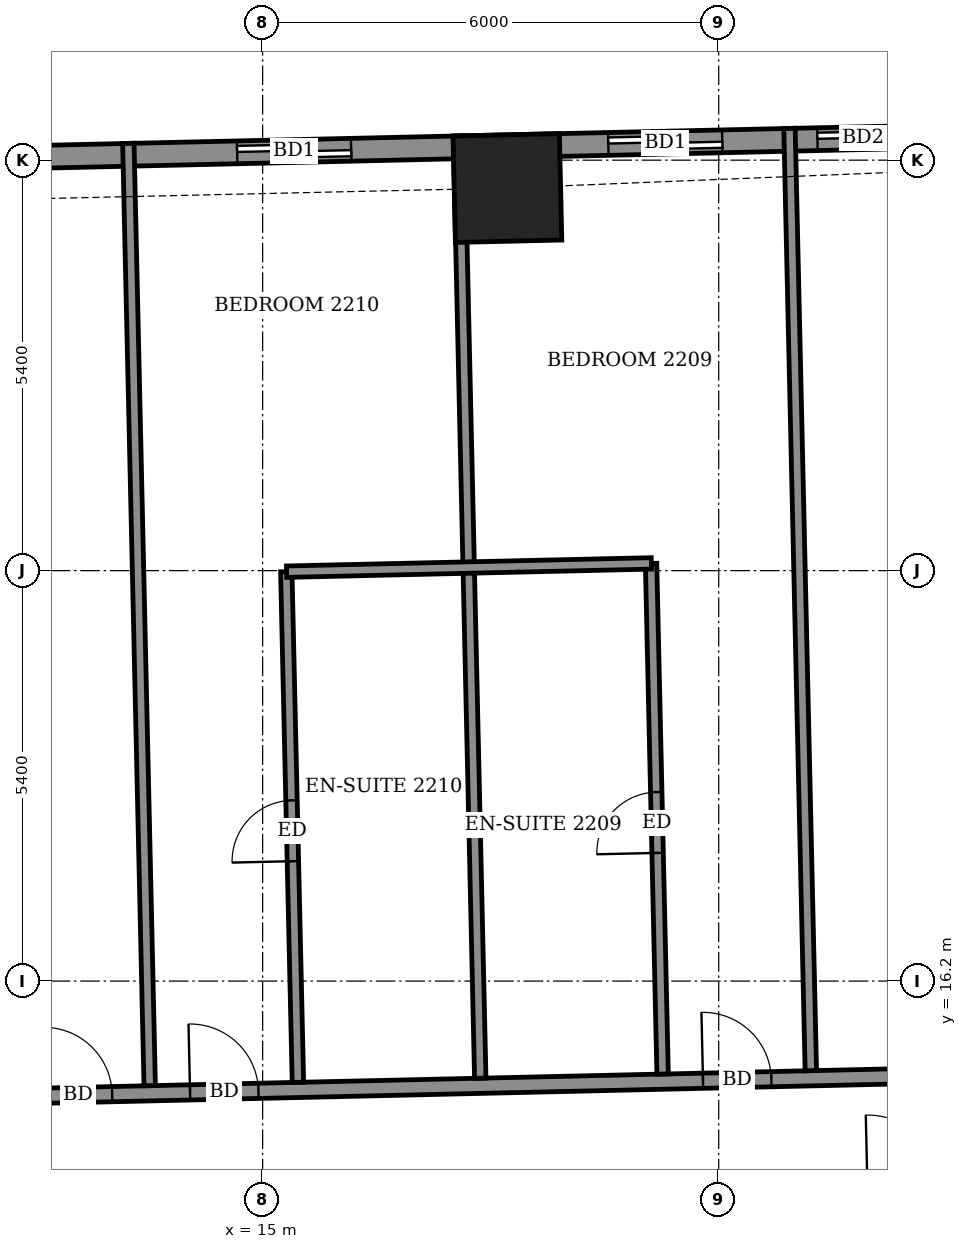
"""IFC4 building model, lengths in metres.
Left out: names, types, materials, properties, quantities, classifications, styles, units other than length and angle.
Written with IfcOpenShell. Run it as: python <this file> out.ifc"""

import sys

from ifc_helpers import new_model, si_unit, direction, frame, frame_2d, origin, origin_2d, place, context, subcontext, project, spatial, rectangle, extrude, element, fill, save


model = new_model("IFC4")
c1 = context("Model", 3, precision=1e-05, world=origin(), true_north=direction((0.0, 1.0)))
c2 = subcontext(c1, "Body", "Model", "MODEL_VIEW")
j1 = project(units=[si_unit("LENGTHUNIT", "METRE"), si_unit("PLANEANGLEUNIT", "RADIAN")], contexts=[c1])
p1 = place(None, origin())
s1 = spatial("IfcSite", under=j1, at=p1, CompositionType="ELEMENT")
p2 = place(p1, origin())
s2 = spatial("IfcBuilding", under=s1, at=p2, CompositionType="ELEMENT")
p3 = place(p2, frame((0.0, 0.0, 90.1)))
s3 = spatial("IfcBuildingStorey", under=s2, at=p3, CompositionType="ELEMENT", Elevation=90.1)
p4 = place(p3, frame((18.22, 26.633, -0.55), z_axis=(0.0, 0.0, 1.0), x_axis=(-0.999741644236, -0.022729821381, 0.0)))
e1 = element("IfcColumn", 1, at=p4, inside=s3, PredefinedType="COLUMN", context=c2, shape_type="SweptSolid", body=[
    extrude(rectangle(XDim=1.4, YDim=1.4, at=origin_2d()), origin(), (0.0, 0.0, 1.0), 3.6),
])
p5 = place(p3, frame((24.809, 27.333, 0.0), z_axis=(0.0, 0.0, 1.0), x_axis=(-0.999742489858, -0.022692597327, 0.0)))
e2 = element("IfcWall", 2, at=p5, inside=s3, PredefinedType="SOLIDWALL", context=c2, shape_type="SweptSolid", body=[
    extrude(rectangle(XDim=46.972, YDim=0.3, at=frame_2d((23.486, 0.0))), origin(), (0.0, 0.0, 1.0), 3.05),
])
p6 = place(p5, frame((1.311, 0.0, 0.0)))
e3 = element("IfcOpeningElement", 3, at=p6, cuts=e2, PredefinedType="OPENING", context=c2, shape_type="SweptSolid", body=[
    extrude(rectangle(XDim=1.2, YDim=2.4, at=frame_2d((0.6, 1.2))), frame((0.0, 0.16, 0.0), z_axis=(0.0, -1.0, 0.0), x_axis=(1.0, 0.0, 0.0)), (0.0, 0.0, 1.0), 0.32),
])
p7 = place(p5, frame((3.763, 0.0, 0.0)))
e4 = element("IfcOpeningElement", 4, at=p7, cuts=e2, PredefinedType="OPENING", context=c2, shape_type="SweptSolid", body=[
    extrude(rectangle(XDim=1.5, YDim=2.4, at=frame_2d((0.75, 1.2))), frame((0.0, 0.16, 0.0), z_axis=(0.0, -1.0, 0.0), x_axis=(1.0, 0.0, 0.0)), (0.0, 0.0, 1.0), 0.32),
])
p8 = place(p5, frame((8.647, 0.0, 0.0)))
e5 = element("IfcOpeningElement", 5, at=p8, cuts=e2, PredefinedType="OPENING", context=c2, shape_type="SweptSolid", body=[
    extrude(rectangle(XDim=1.5, YDim=2.4, at=frame_2d((0.75, 1.2))), frame((0.0, 0.16, 0.0), z_axis=(0.0, -1.0, 0.0), x_axis=(1.0, 0.0, 0.0)), (0.0, 0.0, 1.0), 0.32),
])
p9 = place(p5, frame((14.239, 0.0, 0.0)))
e6 = element("IfcOpeningElement", 6, at=p9, cuts=e2, PredefinedType="OPENING", context=c2, shape_type="SweptSolid", body=[
    extrude(rectangle(XDim=1.2, YDim=2.4, at=frame_2d((0.6, 1.2))), frame((0.0, 0.16, 0.0), z_axis=(0.0, -1.0, 0.0), x_axis=(1.0, 0.0, 0.0)), (0.0, 0.0, 1.0), 0.32),
])
p10 = place(p5, frame((17.016, 0.0, 0.0)))
e7 = element("IfcOpeningElement", 7, at=p10, cuts=e2, PredefinedType="OPENING", context=c2, shape_type="SweptSolid", body=[
    extrude(rectangle(XDim=1.5, YDim=2.4, at=frame_2d((0.75, 1.2))), frame((0.0, 0.16, 0.0), z_axis=(0.0, -1.0, 0.0), x_axis=(1.0, 0.0, 0.0)), (0.0, 0.0, 1.0), 0.32),
])
p11 = place(p5, frame((21.816, 0.0, 0.0)))
e8 = element("IfcOpeningElement", 8, at=p11, cuts=e2, PredefinedType="OPENING", context=c2, shape_type="SweptSolid", body=[
    extrude(rectangle(XDim=1.5, YDim=2.4, at=frame_2d((0.75, 1.2))), frame((0.0, 0.16, 0.0), z_axis=(0.0, -1.0, 0.0), x_axis=(1.0, 0.0, 0.0)), (0.0, 0.0, 1.0), 0.32),
])
p12 = place(p5, frame((24.817, 0.0, 0.0)))
e9 = element("IfcOpeningElement", 9, at=p12, cuts=e2, PredefinedType="OPENING", context=c2, shape_type="SweptSolid", body=[
    extrude(rectangle(XDim=1.2, YDim=2.4, at=frame_2d((0.6, 1.2))), frame((0.0, 0.16, 0.0), z_axis=(0.0, -1.0, 0.0), x_axis=(1.0, 0.0, 0.0)), (0.0, 0.0, 1.0), 0.32),
])
p13 = place(p5, frame((30.244, 0.0, 0.0)))
e10 = element("IfcOpeningElement", 10, at=p13, cuts=e2, PredefinedType="OPENING", context=c2, shape_type="SweptSolid", body=[
    extrude(rectangle(XDim=1.5, YDim=2.4, at=frame_2d((0.75, 1.2))), frame((0.0, 0.16, 0.0), z_axis=(0.0, -1.0, 0.0), x_axis=(1.0, 0.0, 0.0)), (0.0, 0.0, 1.0), 0.32),
])
p14 = place(p5, frame((35.069, 0.0, 0.0)))
e11 = element("IfcOpeningElement", 11, at=p14, cuts=e2, PredefinedType="OPENING", context=c2, shape_type="SweptSolid", body=[
    extrude(rectangle(XDim=1.5, YDim=2.4, at=frame_2d((0.75, 1.2))), frame((0.0, 0.16, 0.0), z_axis=(0.0, -1.0, 0.0), x_axis=(1.0, 0.0, 0.0)), (0.0, 0.0, 1.0), 0.32),
])
p15 = place(p5, frame((37.995, 0.0, 0.0)))
e12 = element("IfcOpeningElement", 12, at=p15, cuts=e2, PredefinedType="OPENING", context=c2, shape_type="SweptSolid", body=[
    extrude(rectangle(XDim=1.5, YDim=2.4, at=frame_2d((0.75, 1.2))), frame((0.0, 0.16, 0.0), z_axis=(0.0, -1.0, 0.0), x_axis=(1.0, 0.0, 0.0)), (0.0, 0.0, 1.0), 0.32),
])
p16 = place(p5, frame((42.674, 0.0, 0.9)))
e13 = element("IfcOpeningElement", 13, at=p16, cuts=e2, PredefinedType="OPENING", context=c2, shape_type="SweptSolid", body=[
    extrude(rectangle(XDim=2.4, YDim=1.5, at=frame_2d((1.2, 0.75))), frame((0.0, 0.16, 0.0), z_axis=(0.0, -1.0, 0.0), x_axis=(1.0, 0.0, 0.0)), (0.0, 0.0, 1.0), 0.32),
])
p17 = place(p3, frame((-24.92, 13.851, 0.0), z_axis=(0.0, 0.0, 1.0), x_axis=(0.999742411711, 0.022696039895, 0.0)))
e14 = element("IfcWall", 14, at=p17, inside=s3, PredefinedType="PARTITIONING", context=c2, shape_type="SweptSolid", body=[
    extrude(rectangle(XDim=52.472, YDim=0.2, at=frame_2d((26.236, 0.0))), origin(), (0.0, 0.0, 1.0), 3.05),
])
p18 = place(p17, frame((50.088, 0.0, 0.0)))
e15 = element("IfcOpeningElement", 15, at=p18, cuts=e14, PredefinedType="OPENING", context=c2, shape_type="SweptSolid", body=[
    extrude(rectangle(XDim=1.0, YDim=2.1, at=frame_2d((0.5, 1.05))), frame((0.0, 0.11, 0.0), z_axis=(0.0, -1.0, 0.0), x_axis=(1.0, 0.0, 0.0)), (0.0, 0.0, 1.0), 0.22),
])
p19 = place(p17, frame((45.725, 0.0, 0.0)))
e16 = element("IfcOpeningElement", 16, at=p19, cuts=e14, PredefinedType="OPENING", context=c2, shape_type="SweptSolid", body=[
    extrude(rectangle(XDim=0.9, YDim=2.1, at=frame_2d((0.45, 1.05))), frame((0.0, 0.11, 0.0), z_axis=(0.0, -1.0, 0.0), x_axis=(1.0, 0.0, 0.0)), (0.0, 0.0, 1.0), 0.22),
])
p20 = place(p17, frame((38.975, 0.0, 0.0)))
e17 = element("IfcOpeningElement", 17, at=p20, cuts=e14, PredefinedType="OPENING", context=c2, shape_type="SweptSolid", body=[
    extrude(rectangle(XDim=0.9, YDim=2.1, at=frame_2d((0.45, 1.05))), frame((0.0, 0.11, 0.0), z_axis=(0.0, -1.0, 0.0), x_axis=(1.0, 0.0, 0.0)), (0.0, 0.0, 1.0), 0.22),
])
p21 = place(p17, frame((37.05, 0.0, 0.0)))
e18 = element("IfcOpeningElement", 18, at=p21, cuts=e14, PredefinedType="OPENING", context=c2, shape_type="SweptSolid", body=[
    extrude(rectangle(XDim=0.9, YDim=2.1, at=frame_2d((0.45, 1.05))), frame((0.0, 0.11, 0.0), z_axis=(0.0, -1.0, 0.0), x_axis=(1.0, 0.0, 0.0)), (0.0, 0.0, 1.0), 0.22),
])
p22 = place(p17, frame((30.35, 0.0, 0.0)))
e19 = element("IfcOpeningElement", 19, at=p22, cuts=e14, PredefinedType="OPENING", context=c2, shape_type="SweptSolid", body=[
    extrude(rectangle(XDim=0.9, YDim=2.1, at=frame_2d((0.45, 1.05))), frame((0.0, 0.11, 0.0), z_axis=(0.0, -1.0, 0.0), x_axis=(1.0, 0.0, 0.0)), (0.0, 0.0, 1.0), 0.22),
])
p23 = place(p17, frame((28.4, 0.0, 0.0)))
e20 = element("IfcOpeningElement", 20, at=p23, cuts=e14, PredefinedType="OPENING", context=c2, shape_type="SweptSolid", body=[
    extrude(rectangle(XDim=0.9, YDim=2.1, at=frame_2d((0.45, 1.05))), frame((0.0, 0.11, 0.0), z_axis=(0.0, -1.0, 0.0), x_axis=(1.0, 0.0, 0.0)), (0.0, 0.0, 1.0), 0.22),
])
p24 = place(p17, frame((21.675, 0.0, 0.0)))
e21 = element("IfcOpeningElement", 21, at=p24, cuts=e14, PredefinedType="OPENING", context=c2, shape_type="SweptSolid", body=[
    extrude(rectangle(XDim=0.9, YDim=2.1, at=frame_2d((0.45, 1.05))), frame((0.0, 0.11, 0.0), z_axis=(0.0, -1.0, 0.0), x_axis=(1.0, 0.0, 0.0)), (0.0, 0.0, 1.0), 0.22),
])
p25 = place(p17, frame((19.775, 0.0, 0.0)))
e22 = element("IfcOpeningElement", 22, at=p25, cuts=e14, PredefinedType="OPENING", context=c2, shape_type="SweptSolid", body=[
    extrude(rectangle(XDim=0.9, YDim=2.1, at=frame_2d((0.45, 1.05))), frame((0.0, 0.11, 0.0), z_axis=(0.0, -1.0, 0.0), x_axis=(1.0, 0.0, 0.0)), (0.0, 0.0, 1.0), 0.22),
])
p26 = place(p17, frame((13.0, 0.0, 0.0)))
e23 = element("IfcOpeningElement", 23, at=p26, cuts=e14, PredefinedType="OPENING", context=c2, shape_type="SweptSolid", body=[
    extrude(rectangle(XDim=0.9, YDim=2.1, at=frame_2d((0.45, 1.05))), frame((0.0, 0.11, 0.0), z_axis=(0.0, -1.0, 0.0), x_axis=(1.0, 0.0, 0.0)), (0.0, 0.0, 1.0), 0.22),
])
p27 = place(p17, frame((11.075, 0.0, 0.0)))
e24 = element("IfcOpeningElement", 24, at=p27, cuts=e14, PredefinedType="OPENING", context=c2, shape_type="SweptSolid", body=[
    extrude(rectangle(XDim=0.9, YDim=2.1, at=frame_2d((0.45, 1.05))), frame((0.0, 0.11, 0.0), z_axis=(0.0, -1.0, 0.0), x_axis=(1.0, 0.0, 0.0)), (0.0, 0.0, 1.0), 0.22),
])
p28 = place(p17, frame((3.049, 0.0, 0.0)))
e25 = element("IfcOpeningElement", 25, at=p28, cuts=e14, PredefinedType="OPENING", context=c2, shape_type="SweptSolid", body=[
    extrude(rectangle(XDim=1.0, YDim=2.1, at=frame_2d((0.5, 1.05))), frame((0.0, 0.11, 0.0), z_axis=(0.0, -1.0, 0.0), x_axis=(1.0, 0.0, 0.0)), (0.0, 0.0, 1.0), 0.22),
])
p29 = place(p3, frame((13.514, 14.824, 0.0), z_axis=(0.0, 0.0, 1.0), x_axis=(-0.022661475803, 0.999743195783, 0.0)))
e26 = element("IfcWall", 26, at=p29, inside=s3, PredefinedType="PARTITIONING", context=c2, shape_type="SweptSolid", body=[
    extrude(rectangle(XDim=12.4, YDim=0.15, at=frame_2d((6.2, 0.0))), origin(), (0.0, 0.0, 1.0), 2.55),
])
p30 = place(p3, frame((15.464, 14.868, 0.0), z_axis=(0.0, 0.0, 1.0), x_axis=(-0.022780001265, 0.999740502102, 0.0)))
e27 = element("IfcWall", 27, at=p30, inside=s3, PredefinedType="PARTITIONING", context=c2, shape_type="SweptSolid", body=[
    extrude(rectangle(XDim=6.72, YDim=0.15, at=frame_2d((3.36, 0.0))), origin(), (0.0, 0.0, 1.0), 3.05),
])
p31 = place(p30, frame((2.91, 0.0, 0.0)))
e28 = element("IfcOpeningElement", 28, at=p31, cuts=e27, PredefinedType="OPENING", context=c2, shape_type="SweptSolid", body=[
    extrude(rectangle(XDim=0.8, YDim=2.1, at=frame_2d((0.4, 1.05))), frame((0.0, 0.085, 0.0), z_axis=(0.0, -1.0, 0.0), x_axis=(1.0, 0.0, 0.0)), (0.0, 0.0, 1.0), 0.17),
])
p32 = place(p3, frame((17.863, 14.922, 0.0), z_axis=(0.0, 0.0, 1.0), x_axis=(-0.022661475803, 0.999743195783, 0.0)))
e29 = element("IfcWall", 29, at=p32, inside=s3, PredefinedType="PARTITIONING", context=c2, shape_type="SweptSolid", body=[
    extrude(rectangle(XDim=12.4, YDim=0.15, at=frame_2d((6.2, 0.0))), origin(), (0.0, 0.0, 1.0), 3.05),
])
p33 = place(p3, frame((20.262, 14.977, 0.0), z_axis=(0.0, 0.0, 1.0), x_axis=(-0.022598435707, 0.999744622743, 0.0)))
e30 = element("IfcWall", 30, at=p33, inside=s3, PredefinedType="PARTITIONING", context=c2, shape_type="SweptSolid", body=[
    extrude(rectangle(XDim=6.72, YDim=0.15, at=frame_2d((3.36, 0.0))), origin(), (0.0, 0.0, 1.0), 3.05),
])
p34 = place(p33, frame((2.91, 0.0, 0.0)))
e31 = element("IfcOpeningElement", 31, at=p34, cuts=e30, PredefinedType="OPENING", context=c2, shape_type="SweptSolid", body=[
    extrude(rectangle(XDim=0.8, YDim=2.1, at=frame_2d((0.4, 1.05))), frame((0.0, 0.085, 0.0), z_axis=(0.0, -1.0, 0.0), x_axis=(1.0, 0.0, 0.0)), (0.0, 0.0, 1.0), 0.17),
])
p35 = place(p3, frame((22.212, 15.021, 0.0), z_axis=(0.0, 0.0, 1.0), x_axis=(-0.022661475803, 0.999743195783, 0.0)))
e32 = element("IfcWall", 32, at=p35, inside=s3, PredefinedType="PARTITIONING", context=c2, shape_type="SweptSolid", body=[
    extrude(rectangle(XDim=12.4, YDim=0.15, at=frame_2d((6.2, 0.0))), origin(), (0.0, 0.0, 1.0), 2.55),
])
p36 = place(p3, frame((15.315, 21.586, 0.0), z_axis=(0.0, 0.0, 1.0), x_axis=(0.99974154664, 0.022734113616, 0.0)))
e33 = element("IfcWall", 33, at=p36, inside=s3, PredefinedType="PARTITIONING", context=c2, shape_type="SweptSolid", body=[
    extrude(rectangle(XDim=4.8, YDim=0.15, at=frame_2d((2.4, 0.0))), origin(), (0.0, 0.0, 1.0), 3.05),
])
p37 = place(p6, origin())
e34 = element("IfcDoor", 34, at=p37, inside=s3, OperationType="SLIDING_TO_LEFT", PredefinedType="DOOR", context=c2, shape_type="SweptSolid", body=[
    extrude(rectangle(XDim=1.2, YDim=2.4, at=frame_2d((0.6, 1.2))), frame((0.0, 0.025, 0.0), z_axis=(0.0, -1.0, 0.0), x_axis=(1.0, 0.0, 0.0)), (0.0, 0.0, 1.0), 0.05),
])
fill(e3, e34)
p38 = place(p7, origin())
e35 = element("IfcDoor", 35, at=p38, inside=s3, OperationType="SLIDING_TO_LEFT", PredefinedType="DOOR", context=c2, shape_type="SweptSolid", body=[
    extrude(rectangle(XDim=1.5, YDim=2.4, at=frame_2d((0.75, 1.2))), frame((0.0, 0.025, 0.0), z_axis=(0.0, -1.0, 0.0), x_axis=(1.0, 0.0, 0.0)), (0.0, 0.0, 1.0), 0.05),
])
fill(e4, e35)
p39 = place(p8, origin())
e36 = element("IfcDoor", 36, at=p39, inside=s3, OperationType="SLIDING_TO_LEFT", PredefinedType="DOOR", context=c2, shape_type="SweptSolid", body=[
    extrude(rectangle(XDim=1.5, YDim=2.4, at=frame_2d((0.75, 1.2))), frame((0.0, 0.025, 0.0), z_axis=(0.0, -1.0, 0.0), x_axis=(1.0, 0.0, 0.0)), (0.0, 0.0, 1.0), 0.05),
])
fill(e5, e36)
p40 = place(p19, origin())
e37 = element("IfcDoor", 37, at=p40, inside=s3, OperationType="SINGLE_SWING_LEFT", PredefinedType="DOOR", context=c2, shape_type="SweptSolid", body=[
    extrude(rectangle(XDim=0.9, YDim=2.1, at=frame_2d((0.45, 1.05))), frame((0.0, 0.025, 0.0), z_axis=(0.0, -1.0, 0.0), x_axis=(1.0, 0.0, 0.0)), (0.0, 0.0, 1.0), 0.05),
])
fill(e16, e37)
p41 = place(p34, origin())
e38 = element("IfcDoor", 38, at=p41, inside=s3, OperationType="SINGLE_SWING_LEFT", PredefinedType="DOOR", context=c2, shape_type="SweptSolid", body=[
    extrude(rectangle(XDim=0.8, YDim=2.1, at=frame_2d((0.4, 1.05))), frame((0.0, 0.025, 0.0), z_axis=(0.0, -1.0, 0.0), x_axis=(1.0, 0.0, 0.0)), (0.0, 0.0, 1.0), 0.05),
])
fill(e31, e38)
p42 = place(p20, origin())
e39 = element("IfcDoor", 39, at=p42, inside=s3, OperationType="SINGLE_SWING_RIGHT", PredefinedType="DOOR", context=c2, shape_type="SweptSolid", body=[
    extrude(rectangle(XDim=0.9, YDim=2.1, at=frame_2d((0.45, 1.05))), frame((0.0, 0.025, 0.0), z_axis=(0.0, -1.0, 0.0), x_axis=(1.0, 0.0, 0.0)), (0.0, 0.0, 1.0), 0.05),
])
fill(e17, e39)
p43 = place(p31, origin())
e40 = element("IfcDoor", 40, at=p43, inside=s3, OperationType="SINGLE_SWING_RIGHT", PredefinedType="DOOR", context=c2, shape_type="SweptSolid", body=[
    extrude(rectangle(XDim=0.8, YDim=2.1, at=frame_2d((0.4, 1.05))), frame((0.0, 0.025, 0.0), z_axis=(0.0, -1.0, 0.0), x_axis=(1.0, 0.0, 0.0)), (0.0, 0.0, 1.0), 0.05),
])
fill(e28, e40)
p44 = place(p21, origin())
e41 = element("IfcDoor", 41, at=p44, inside=s3, OperationType="SINGLE_SWING_LEFT", PredefinedType="DOOR", context=c2, shape_type="SweptSolid", body=[
    extrude(rectangle(XDim=0.9, YDim=2.1, at=frame_2d((0.45, 1.05))), frame((0.0, 0.025, 0.0), z_axis=(0.0, -1.0, 0.0), x_axis=(1.0, 0.0, 0.0)), (0.0, 0.0, 1.0), 0.05),
])
fill(e18, e41)
save(model, sys.argv[1])
